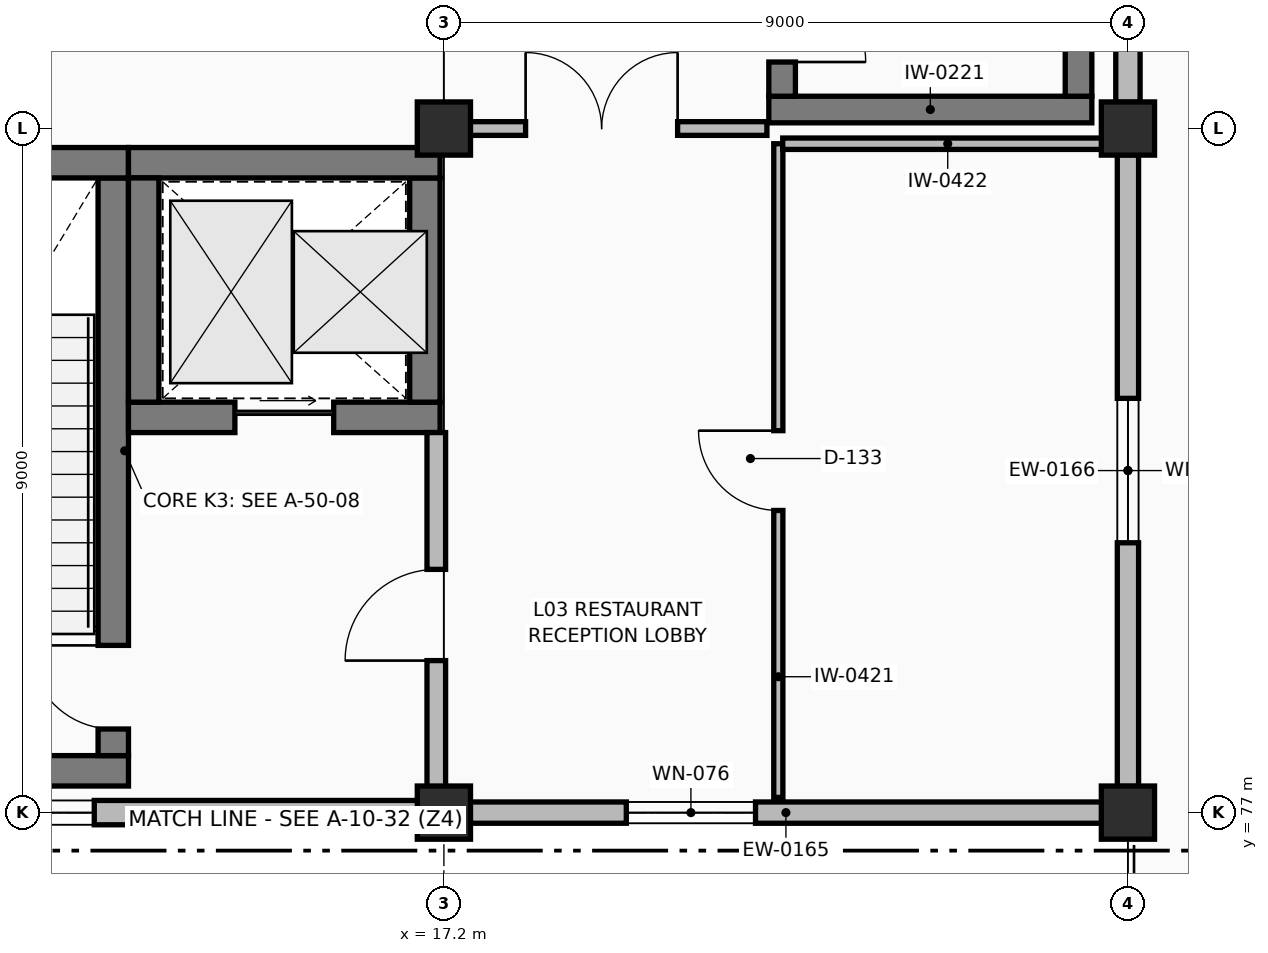
"""IFC4 building model, lengths in metres.
Left out: names, types, materials, properties, quantities, classifications, styles, units other than length and angle.
Written with IfcOpenShell. Run it as: python <this file> out.ifc"""

import sys

from ifc_helpers import new_model, si_unit, direction, frame, frame_2d, origin, origin_2d, place, context, subcontext, project, spatial, rectangle, extrude, element, fill, save


model = new_model("IFC4")
c1 = context("Model", 3, precision=1e-05, world=origin(), true_north=direction((0.0, 1.0)))
c2 = subcontext(c1, "Body", "Model", "MODEL_VIEW")
j1 = project(units=[si_unit("LENGTHUNIT", "METRE"), si_unit("PLANEANGLEUNIT", "RADIAN")], contexts=[c1])
p1 = place(None, origin())
s1 = spatial("IfcSite", under=j1, at=p1, CompositionType="ELEMENT")
p2 = place(p1, origin())
s2 = spatial("IfcBuilding", under=s1, at=p2, CompositionType="ELEMENT")
p3 = place(p2, frame((0.0, 0.0, 14.4)))
s3 = spatial("IfcBuildingStorey", under=s2, at=p3, CompositionType="ELEMENT", Elevation=14.4)
for number, where, z_axis, x_axis in (
    (1, (17.2, 77.0, 0.0), (0.0, 0.0, 1.0), (1.0, 0.0, 0.0)),
    (2, (17.2, 86.0, 0.0), (0.0, 0.0, 1.0), (1.0, 0.0, 0.0)),
    (3, (26.2, 77.0, 0.0), (0.0, 0.0, 1.0), (1.0, 0.0, 0.0)),
    (4, (26.2, 86.0, 0.0), (0.0, 0.0, 1.0), (1.0, 0.0, 0.0)),
):
    element("IfcColumn", number, at=place(p3, frame(where, z_axis=z_axis, x_axis=x_axis)), inside=s3, PredefinedType="COLUMN", context=c2, shape_type="SweptSolid", body=[
        extrude(rectangle(XDim=0.7, YDim=0.7, at=origin_2d()), origin(), (0.0, 0.0, 1.0), 4.5),
    ])
p4 = place(p3, frame((8.545, 77.0, 0.0), z_axis=(0.0, 0.0, 1.0), x_axis=(1.0, 0.0, 0.0)))
e5 = element("IfcWall", 5, at=p4, inside=s3, PredefinedType="SOLIDWALL", context=c2, shape_type="SweptSolid", body=[
    extrude(rectangle(XDim=8.31, YDim=0.32, at=frame_2d((4.155, 0.0))), origin(), (0.0, 0.0, 1.0), 3.314),
])
p5 = place(p4, frame((2.755, 0.0, 0.9)))
e6 = element("IfcOpeningElement", 6, at=p5, cuts=e5, PredefinedType="OPENING", context=c2, shape_type="SweptSolid", body=[
    extrude(rectangle(XDim=1.3, YDim=1.45, at=frame_2d((0.65, 0.725))), frame((0.0, 0.17, 0.0), z_axis=(0.0, -1.0, 0.0), x_axis=(1.0, 0.0, 0.0)), (0.0, 0.0, 1.0), 0.34),
])
p6 = place(p3, frame((17.545, 77.0, 0.0), z_axis=(0.0, 0.0, 1.0), x_axis=(1.0, 0.0, 0.0)))
e7 = element("IfcWall", 7, at=p6, inside=s3, PredefinedType="SOLIDWALL", context=c2, shape_type="SweptSolid", body=[
    extrude(rectangle(XDim=8.31, YDim=0.28, at=frame_2d((4.155, 0.0))), origin(), (0.0, 0.0, 1.0), 3.314),
])
p7 = place(p6, frame((2.055, 0.0, 0.9)))
e8 = element("IfcOpeningElement", 8, at=p7, cuts=e7, PredefinedType="OPENING", context=c2, shape_type="SweptSolid", body=[
    extrude(rectangle(XDim=1.7, YDim=1.5, at=frame_2d((0.85, 0.75))), frame((0.0, 0.15, 0.0), z_axis=(0.0, -1.0, 0.0), x_axis=(1.0, 0.0, 0.0)), (0.0, 0.0, 1.0), 0.3),
])
p8 = place(p3, frame((26.2, 77.345, 0.0), z_axis=(0.0, 0.0, 1.0), x_axis=(0.0, 1.0, 0.0)))
e9 = element("IfcWall", 9, at=p8, inside=s3, PredefinedType="SOLIDWALL", context=c2, shape_type="SweptSolid", body=[
    extrude(rectangle(XDim=8.31, YDim=0.28, at=frame_2d((4.155, 0.0))), origin(), (0.0, 0.0, 1.0), 3.472),
])
p9 = place(p8, frame((3.205, 0.0, 0.9)))
e10 = element("IfcOpeningElement", 10, at=p9, cuts=e9, PredefinedType="OPENING", context=c2, shape_type="SweptSolid", body=[
    extrude(rectangle(XDim=1.9, YDim=1.55, at=frame_2d((0.95, 0.775))), frame((0.0, 0.15, 0.0), z_axis=(0.0, -1.0, 0.0), x_axis=(1.0, 0.0, 0.0)), (0.0, 0.0, 1.0), 0.3),
])
p10 = place(p3, frame((26.2, 86.345, 0.0), z_axis=(0.0, 0.0, 1.0), x_axis=(0.0, 1.0, 0.0)))
e11 = element("IfcWall", 11, at=p10, inside=s3, PredefinedType="SOLIDWALL", context=c2, shape_type="SweptSolid", body=[
    extrude(rectangle(XDim=8.31, YDim=0.32, at=frame_2d((4.155, 0.0))), origin(), (0.0, 0.0, 1.0), 3.472),
])
p11 = place(p10, frame((3.255, 0.0, 0.0)))
e12 = element("IfcOpeningElement", 12, at=p11, cuts=e11, PredefinedType="OPENING", context=c2, shape_type="SweptSolid", body=[
    extrude(rectangle(XDim=1.8, YDim=2.3, at=frame_2d((0.9, 1.15))), frame((0.0, 0.17, 0.0), z_axis=(0.0, -1.0, 0.0), x_axis=(1.0, 0.0, 0.0)), (0.0, 0.0, 1.0), 0.34),
])
p12 = place(p3, frame((8.65, 77.55, 0.0), z_axis=(0.0, 0.0, 1.0), x_axis=(1.0, 0.0, 0.0)))
e13 = element("IfcWall", 13, at=p12, inside=s3, PredefinedType="SHEAR", context=c2, shape_type="SweptSolid", body=[
    extrude(rectangle(XDim=4.4, YDim=0.4, at=frame_2d((2.2, 0.0))), origin(), (0.0, 0.0, 1.0), 4.19),
])
p13 = place(p3, frame((12.85, 77.75, 0.0), z_axis=(0.0, 0.0, 1.0), x_axis=(0.0, 1.0, 0.0)))
e14 = element("IfcWall", 14, at=p13, inside=s3, PredefinedType="SHEAR", context=c2, shape_type="SweptSolid", body=[
    extrude(rectangle(XDim=7.6, YDim=0.4, at=frame_2d((3.8, 0.0))), origin(), (0.0, 0.0, 1.0), 4.19),
])
p14 = place(p13, frame((0.35, 0.0, 0.0)))
e15 = element("IfcOpeningElement", 15, at=p14, cuts=e14, PredefinedType="OPENING", context=c2, shape_type="SweptSolid", body=[
    extrude(rectangle(XDim=1.1, YDim=2.2, at=frame_2d((0.55, 1.1))), frame((0.0, 0.21, 0.0), z_axis=(0.0, -1.0, 0.0), x_axis=(1.0, 0.0, 0.0)), (0.0, 0.0, 1.0), 0.42),
])
p15 = place(p3, frame((13.05, 85.55, 0.0), z_axis=(0.0, 0.0, 1.0), x_axis=(-1.0, 0.0, 0.0)))
e16 = element("IfcWall", 16, at=p15, inside=s3, PredefinedType="SHEAR", context=c2, shape_type="SweptSolid", body=[
    extrude(rectangle(XDim=4.4, YDim=0.4, at=frame_2d((2.2, 0.0))), origin(), (0.0, 0.0, 1.0), 4.19),
])
p16 = place(p3, frame((13.05, 82.2, 0.0), z_axis=(0.0, 0.0, 1.0), x_axis=(1.0, 0.0, 0.0)))
e17 = element("IfcWall", 17, at=p16, inside=s3, PredefinedType="SHEAR", context=c2, shape_type="SweptSolid", body=[
    extrude(rectangle(XDim=4.1, YDim=0.4, at=frame_2d((2.05, 0.0))), origin(), (0.0, 0.0, 1.0), 4.19),
])
p17 = place(p16, frame((1.4, 0.0, 0.0)))
e18 = element("IfcOpeningElement", 18, at=p17, cuts=e17, PredefinedType="OPENING", context=c2, shape_type="SweptSolid", body=[
    extrude(rectangle(XDim=1.3, YDim=2.25, at=frame_2d((0.65, 1.125))), frame((0.0, 0.21, 0.0), z_axis=(0.0, -1.0, 0.0), x_axis=(1.0, 0.0, 0.0)), (0.0, 0.0, 1.0), 0.42),
])
p18 = place(p3, frame((16.95, 82.4, 0.0), z_axis=(0.0, 0.0, 1.0), x_axis=(0.0, 1.0, 0.0)))
e19 = element("IfcWall", 19, at=p18, inside=s3, PredefinedType="SHEAR", context=c2, shape_type="SweptSolid", body=[
    extrude(rectangle(XDim=2.95, YDim=0.4, at=frame_2d((1.475, 0.0))), origin(), (0.0, 0.0, 1.0), 4.19),
])
p19 = place(p3, frame((17.15, 85.55, 0.0), z_axis=(0.0, 0.0, 1.0), x_axis=(-1.0, 0.0, 0.0)))
e20 = element("IfcWall", 20, at=p19, inside=s3, PredefinedType="SHEAR", context=c2, shape_type="SweptSolid", body=[
    extrude(rectangle(XDim=4.1, YDim=0.4, at=frame_2d((2.05, 0.0))), origin(), (0.0, 0.0, 1.0), 4.19),
])
p20 = place(p3, frame((13.25, 85.35, 0.0), z_axis=(0.0, 0.0, 1.0), x_axis=(0.0, -1.0, 0.0)))
e21 = element("IfcWall", 21, at=p20, inside=s3, PredefinedType="SHEAR", context=c2, shape_type="SweptSolid", body=[
    extrude(rectangle(XDim=2.95, YDim=0.4, at=frame_2d((1.475, 0.0))), origin(), (0.0, 0.0, 1.0), 4.19),
])
p21 = place(p3, frame((21.475, 86.25, 0.0), z_axis=(0.0, 0.0, 1.0), x_axis=(1.0, 0.0, 0.0)))
e22 = element("IfcWall", 22, at=p21, inside=s3, PredefinedType="SHEAR", context=c2, shape_type="SweptSolid", body=[
    extrude(rectangle(XDim=4.25, YDim=0.35, at=frame_2d((2.125, 0.0))), origin(), (0.0, 0.0, 1.0), 4.19),
])
p22 = place(p3, frame((25.55, 86.425, 0.0), z_axis=(0.0, 0.0, 1.0), x_axis=(0.0, 1.0, 0.0)))
e23 = element("IfcWall", 23, at=p22, inside=s3, PredefinedType="SHEAR", context=c2, shape_type="SweptSolid", body=[
    extrude(rectangle(XDim=7.55, YDim=0.35, at=frame_2d((3.775, 0.0))), origin(), (0.0, 0.0, 1.0), 4.19),
])
p23 = place(p3, frame((21.65, 93.975, 0.0), z_axis=(0.0, 0.0, 1.0), x_axis=(0.0, -1.0, 0.0)))
e24 = element("IfcWall", 24, at=p23, inside=s3, PredefinedType="SHEAR", context=c2, shape_type="SweptSolid", body=[
    extrude(rectangle(XDim=7.55, YDim=0.35, at=frame_2d((3.775, 0.0))), origin(), (0.0, 0.0, 1.0), 4.19),
])
p24 = place(p23, frame((6.0, 0.0, 0.0)))
e25 = element("IfcOpeningElement", 25, at=p24, cuts=e24, PredefinedType="OPENING", context=c2, shape_type="SweptSolid", body=[
    extrude(rectangle(XDim=1.1, YDim=2.2, at=frame_2d((0.55, 1.1))), frame((0.0, 0.185, 0.0), z_axis=(0.0, -1.0, 0.0), x_axis=(1.0, 0.0, 0.0)), (0.0, 0.0, 1.0), 0.37),
])
p25 = place(p3, frame((17.1, 77.2, 0.0), z_axis=(0.0, 0.0, 1.0), x_axis=(0.0, 1.0, 0.0)))
e26 = element("IfcWall", 26, at=p25, inside=s3, PredefinedType="PARTITIONING", context=c2, shape_type="SweptSolid", body=[
    extrude(rectangle(XDim=4.8, YDim=0.245, at=frame_2d((2.4, 0.0))), origin(), (0.0, 0.0, 1.0), 3.304),
])
p26 = place(p25, frame((1.8, 0.0, 0.0)))
e27 = element("IfcOpeningElement", 27, at=p26, cuts=e26, PredefinedType="OPENING", context=c2, shape_type="SweptSolid", body=[
    extrude(rectangle(XDim=1.2, YDim=2.2, at=frame_2d((0.6, 1.1))), frame((0.0, 0.133, 0.0), z_axis=(0.0, -1.0, 0.0), x_axis=(1.0, 0.0, 0.0)), (0.0, 0.0, 1.0), 0.265),
])
p27 = place(p3, frame((21.6, 77.2, 0.0), z_axis=(0.0, 0.0, 1.0), x_axis=(0.0, 1.0, 0.0)))
e28 = element("IfcWall", 28, at=p27, inside=s3, PredefinedType="PARTITIONING", context=c2, shape_type="SweptSolid", body=[
    extrude(rectangle(XDim=8.6, YDim=0.12, at=frame_2d((4.3, 0.0))), origin(), (0.0, 0.0, 1.0), 3.462),
])
p28 = place(p27, frame((3.775, 0.0, 0.0)))
e29 = element("IfcOpeningElement", 29, at=p28, cuts=e28, PredefinedType="OPENING", context=c2, shape_type="SweptSolid", body=[
    extrude(rectangle(XDim=1.05, YDim=2.15, at=frame_2d((0.525, 1.075))), frame((0.0, 0.07, 0.0), z_axis=(0.0, -1.0, 0.0), x_axis=(1.0, 0.0, 0.0)), (0.0, 0.0, 1.0), 0.14),
])
p29 = place(p3, frame((21.658, 85.8, 0.0), z_axis=(0.0, 0.0, 1.0), x_axis=(1.0, 0.0, 0.0)))
e30 = element("IfcWall", 30, at=p29, inside=s3, PredefinedType="PARTITIONING", context=c2, shape_type="SweptSolid", body=[
    extrude(rectangle(XDim=4.342, YDim=0.15, at=frame_2d((2.171, 0.0))), origin(), (0.0, 0.0, 1.0), 3.462),
])
p30 = place(p3, frame((17.1, 86.0, 0.0), z_axis=(0.0, 0.0, 1.0), x_axis=(1.0, 0.0, 0.0)))
e31 = element("IfcWall", 31, at=p30, inside=s3, PredefinedType="STANDARD", context=c2, shape_type="SweptSolid", body=[
    extrude(rectangle(XDim=4.35, YDim=0.18, at=frame_2d((2.175, 0.0))), origin(), (0.0, 0.0, 1.0), 3.304),
])
p31 = place(p30, frame((1.175, 0.0, 0.0)))
e32 = element("IfcOpeningElement", 32, at=p31, cuts=e31, PredefinedType="OPENING", context=c2, shape_type="SweptSolid", body=[
    extrude(rectangle(XDim=2.0, YDim=2.4, at=frame_2d((1.0, 1.2))), frame((0.0, 0.1, 0.0), z_axis=(0.0, -1.0, 0.0), x_axis=(1.0, 0.0, 0.0)), (0.0, 0.0, 1.0), 0.2),
])
p32 = place(p5, origin())
e33 = element("IfcWindow", 33, at=p32, inside=s3, PartitioningType="SINGLE_PANEL", PredefinedType="WINDOW", context=c2, shape_type="SweptSolid", body=[
    extrude(rectangle(XDim=1.3, YDim=1.45, at=frame_2d((0.65, 0.725))), frame((0.0, 0.03, 0.0), z_axis=(0.0, -1.0, 0.0), x_axis=(1.0, 0.0, 0.0)), (0.0, 0.0, 1.0), 0.06),
])
fill(e6, e33)
p33 = place(p7, origin())
e34 = element("IfcWindow", 34, at=p33, inside=s3, PartitioningType="SINGLE_PANEL", PredefinedType="WINDOW", context=c2, shape_type="SweptSolid", body=[
    extrude(rectangle(XDim=1.7, YDim=1.5, at=frame_2d((0.85, 0.75))), frame((0.0, 0.03, 0.0), z_axis=(0.0, -1.0, 0.0), x_axis=(1.0, 0.0, 0.0)), (0.0, 0.0, 1.0), 0.06),
])
fill(e8, e34)
p34 = place(p9, origin())
e35 = element("IfcWindow", 35, at=p34, inside=s3, PartitioningType="SINGLE_PANEL", PredefinedType="WINDOW", context=c2, shape_type="SweptSolid", body=[
    extrude(rectangle(XDim=1.9, YDim=1.55, at=frame_2d((0.95, 0.775))), frame((0.0, 0.03, 0.0), z_axis=(0.0, -1.0, 0.0), x_axis=(1.0, 0.0, 0.0)), (0.0, 0.0, 1.0), 0.06),
])
fill(e10, e35)
p35 = place(p14, origin())
e36 = element("IfcDoor", 36, at=p35, inside=s3, OperationType="SINGLE_SWING_RIGHT", PredefinedType="DOOR", context=c2, shape_type="SweptSolid", body=[
    extrude(rectangle(XDim=1.1, YDim=2.2, at=frame_2d((0.55, 1.1))), frame((0.0, 0.025, 0.0), z_axis=(0.0, -1.0, 0.0), x_axis=(1.0, 0.0, 0.0)), (0.0, 0.0, 1.0), 0.05),
])
fill(e15, e36)
p36 = place(p17, origin())
e37 = element("IfcDoor", 37, at=p36, inside=s3, OperationType="SLIDING_TO_RIGHT", PredefinedType="DOOR", context=c2, shape_type="SweptSolid", body=[
    extrude(rectangle(XDim=1.3, YDim=2.25, at=frame_2d((0.65, 1.125))), frame((0.0, 0.025, 0.0), z_axis=(0.0, -1.0, 0.0), x_axis=(1.0, 0.0, 0.0)), (0.0, 0.0, 1.0), 0.05),
])
fill(e18, e37)
p37 = place(p24, origin())
e38 = element("IfcDoor", 38, at=p37, inside=s3, OperationType="SINGLE_SWING_RIGHT", PredefinedType="DOOR", context=c2, shape_type="SweptSolid", body=[
    extrude(rectangle(XDim=1.1, YDim=2.2, at=frame_2d((0.55, 1.1))), frame((0.0, 0.025, 0.0), z_axis=(0.0, -1.0, 0.0), x_axis=(1.0, 0.0, 0.0)), (0.0, 0.0, 1.0), 0.05),
])
fill(e25, e38)
p38 = place(p26, origin())
e39 = element("IfcDoor", 39, at=p38, inside=s3, OperationType="SINGLE_SWING_LEFT", PredefinedType="DOOR", context=c2, shape_type="SweptSolid", body=[
    extrude(rectangle(XDim=1.2, YDim=2.2, at=frame_2d((0.6, 1.1))), frame((0.0, 0.025, 0.0), z_axis=(0.0, -1.0, 0.0), x_axis=(1.0, 0.0, 0.0)), (0.0, 0.0, 1.0), 0.05),
])
fill(e27, e39)
p39 = place(p28, origin())
e40 = element("IfcDoor", 40, at=p39, inside=s3, OperationType="SINGLE_SWING_RIGHT", PredefinedType="DOOR", context=c2, shape_type="SweptSolid", body=[
    extrude(rectangle(XDim=1.05, YDim=2.15, at=frame_2d((0.525, 1.075))), frame((0.0, 0.025, 0.0), z_axis=(0.0, -1.0, 0.0), x_axis=(1.0, 0.0, 0.0)), (0.0, 0.0, 1.0), 0.05),
])
fill(e29, e40)
p40 = place(p31, origin())
e41 = element("IfcDoor", 41, at=p40, inside=s3, OperationType="DOUBLE_DOOR_SINGLE_SWING", PredefinedType="DOOR", context=c2, shape_type="SweptSolid", body=[
    extrude(rectangle(XDim=2.0, YDim=2.4, at=frame_2d((1.0, 1.2))), frame((0.0, 0.025, 0.0), z_axis=(0.0, -1.0, 0.0), x_axis=(1.0, 0.0, 0.0)), (0.0, 0.0, 1.0), 0.05),
])
fill(e32, e41)
save(model, sys.argv[1])
